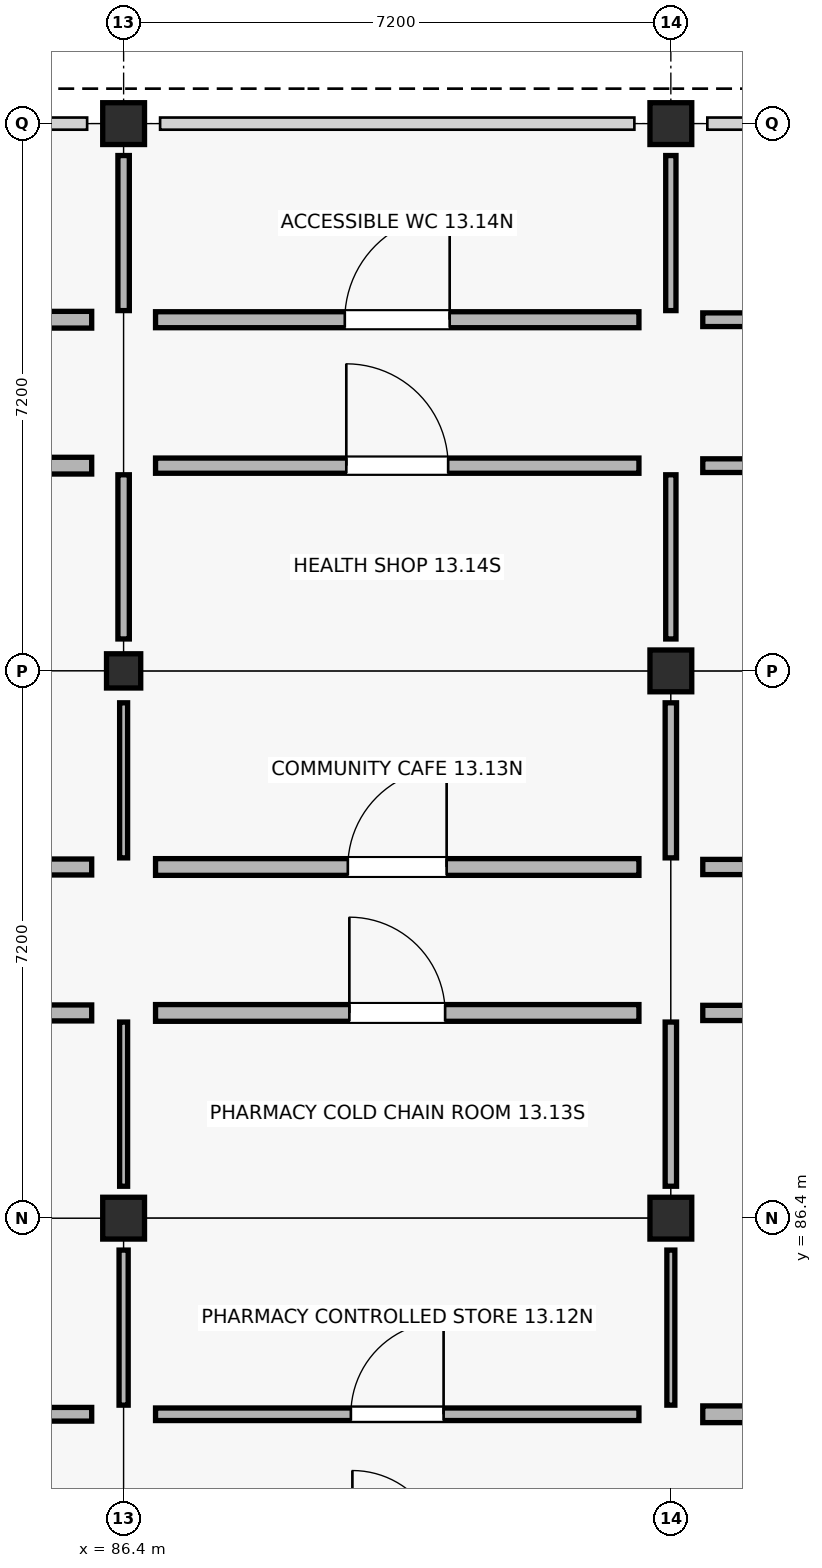
"""IFC4 building model, lengths in metres.
Left out: names, types, materials, properties, quantities, classifications, styles, units other than length and angle.
Written with IfcOpenShell. Run it as: python <this file> out.ifc"""

import sys

from ifc_helpers import new_model, si_unit, direction, frame, frame_2d, origin, origin_2d, place, context, subcontext, project, spatial, rectangle, extrude, element, fill, save


model = new_model("IFC4")
c1 = context("Model", 3, precision=1e-05, world=origin(), true_north=direction((0.0, 1.0)))
c2 = subcontext(c1, "Body", "Model", "MODEL_VIEW")
j1 = project(units=[si_unit("LENGTHUNIT", "METRE"), si_unit("PLANEANGLEUNIT", "RADIAN")], contexts=[c1])
p1 = place(None, origin())
s1 = spatial("IfcSite", under=j1, at=p1, CompositionType="ELEMENT")
p2 = place(p1, origin())
s2 = spatial("IfcBuilding", under=s1, at=p2, CompositionType="ELEMENT")
p3 = place(p2, origin())
s3 = spatial("IfcBuildingStorey", under=s2, at=p3, CompositionType="ELEMENT", Elevation=0.0)
p4 = place(p3, frame((86.4, 86.4, -0.25), z_axis=(0.0, 0.0, 1.0), x_axis=(1.0, 0.0, 0.0)))
e1 = element("IfcColumn", 1, at=p4, inside=s3, PredefinedType="COLUMN", context=c2, shape_type="SweptSolid", body=[
    extrude(rectangle(XDim=0.55, YDim=0.55, at=origin_2d()), origin(), (0.0, 0.0, 1.0), 4.75),
])
p5 = place(p3, frame((86.4, 93.6, -0.25), z_axis=(0.0, 0.0, 1.0), x_axis=(1.0, 0.0, 0.0)))
e2 = element("IfcColumn", 2, at=p5, inside=s3, PredefinedType="COLUMN", context=c2, shape_type="SweptSolid", body=[
    extrude(rectangle(XDim=0.45, YDim=0.45, at=origin_2d()), origin(), (0.0, 0.0, 1.0), 4.53),
])
for number, where, z_axis, x_axis in (
    (3, (86.4, 100.8, -0.25), (0.0, 0.0, 1.0), (1.0, 0.0, 0.0)),
    (4, (93.6, 86.4, -0.25), (0.0, 0.0, 1.0), (1.0, 0.0, 0.0)),
    (5, (93.6, 93.6, -0.25), (0.0, 0.0, 1.0), (1.0, 0.0, 0.0)),
    (6, (93.6, 100.8, -0.25), (0.0, 0.0, 1.0), (1.0, 0.0, 0.0)),
):
    element("IfcColumn", number, at=place(p3, frame(where, z_axis=z_axis, x_axis=x_axis)), inside=s3, PredefinedType="COLUMN", context=c2, shape_type="SweptSolid", body=[
        extrude(rectangle(XDim=0.55, YDim=0.55, at=origin_2d()), origin(), (0.0, 0.0, 1.0), 4.75),
    ])
p6 = place(p3, frame((79.62, 83.82, 0.0), z_axis=(0.0, 0.0, 1.0), x_axis=(1.0, 0.0, 0.0)))
e7 = element("IfcWall", 7, at=p6, inside=s3, PredefinedType="PARTITIONING", context=c2, shape_type="SweptSolid", body=[
    extrude(rectangle(XDim=6.36, YDim=0.18, at=frame_2d((3.18, 0.0))), origin(), (0.0, 0.0, 1.0), 3.36),
])
p7 = place(p6, frame((2.69, 0.0, 0.0)))
e8 = element("IfcOpeningElement", 8, at=p7, cuts=e7, PredefinedType="OPENING", context=c2, shape_type="SweptSolid", body=[
    extrude(rectangle(XDim=0.98, YDim=2.04, at=frame_2d((0.49, 1.02))), frame((0.0, 0.1, 0.0), z_axis=(0.0, -1.0, 0.0), x_axis=(1.0, 0.0, 0.0)), (0.0, 0.0, 1.0), 0.2),
])
p8 = place(p3, frame((86.4, 83.94, 0.0), z_axis=(0.0, 0.0, 1.0), x_axis=(0.0, 1.0, 0.0)))
e9 = element("IfcWall", 9, at=p8, inside=s3, PredefinedType="PARTITIONING", context=c2, shape_type="SweptSolid", body=[
    extrude(rectangle(XDim=2.04, YDim=0.12, at=frame_2d((1.02, 0.0))), origin(), (0.0, 0.0, 1.0), 3.36),
])
p9 = place(p3, frame((79.62, 89.1, 0.0), z_axis=(0.0, 0.0, 1.0), x_axis=(1.0, 0.0, 0.0)))
e10 = element("IfcWall", 10, at=p9, inside=s3, PredefinedType="PLUMBINGWALL", context=c2, shape_type="SweptSolid", body=[
    extrude(rectangle(XDim=6.36, YDim=0.21, at=frame_2d((3.18, 0.0))), origin(), (0.0, 0.0, 1.0), 3.36),
])
p10 = place(p9, frame((2.67, 0.0, 0.0)))
e11 = element("IfcOpeningElement", 11, at=p10, cuts=e10, PredefinedType="OPENING", context=c2, shape_type="SweptSolid", body=[
    extrude(rectangle(XDim=1.02, YDim=2.04, at=frame_2d((0.51, 1.02))), frame((0.0, 0.115, 0.0), z_axis=(0.0, -1.0, 0.0), x_axis=(1.0, 0.0, 0.0)), (0.0, 0.0, 1.0), 0.23),
])
p11 = place(p3, frame((86.4, 86.82, 0.0), z_axis=(0.0, 0.0, 1.0), x_axis=(0.0, 1.0, 0.0)))
e12 = element("IfcWall", 12, at=p11, inside=s3, PredefinedType="PARTITIONING", context=c2, shape_type="SweptSolid", body=[
    extrude(rectangle(XDim=2.16, YDim=0.105, at=frame_2d((1.08, 0.0))), origin(), (0.0, 0.0, 1.0), 3.36),
])
p12 = place(p3, frame((79.62, 91.02, 0.0), z_axis=(0.0, 0.0, 1.0), x_axis=(1.0, 0.0, 0.0)))
e13 = element("IfcWall", 13, at=p12, inside=s3, PredefinedType="PLUMBINGWALL", context=c2, shape_type="SweptSolid", body=[
    extrude(rectangle(XDim=6.36, YDim=0.21, at=frame_2d((3.18, 0.0))), origin(), (0.0, 0.0, 1.0), 3.36),
])
p13 = place(p12, frame((2.65, 0.0, 0.0)))
e14 = element("IfcOpeningElement", 14, at=p13, cuts=e13, PredefinedType="OPENING", context=c2, shape_type="SweptSolid", body=[
    extrude(rectangle(XDim=1.06, YDim=2.04, at=frame_2d((0.53, 1.02))), frame((0.0, 0.115, 0.0), z_axis=(0.0, -1.0, 0.0), x_axis=(1.0, 0.0, 0.0)), (0.0, 0.0, 1.0), 0.23),
])
p14 = place(p3, frame((86.4, 91.14, 0.0), z_axis=(0.0, 0.0, 1.0), x_axis=(0.0, 1.0, 0.0)))
e15 = element("IfcWall", 15, at=p14, inside=s3, PredefinedType="PARTITIONING", context=c2, shape_type="SweptSolid", body=[
    extrude(rectangle(XDim=2.04, YDim=0.105, at=frame_2d((1.02, 0.0))), origin(), (0.0, 0.0, 1.0), 3.36),
])
p15 = place(p3, frame((79.62, 96.3, 0.0), z_axis=(0.0, 0.0, 1.0), x_axis=(1.0, 0.0, 0.0)))
e16 = element("IfcWall", 16, at=p15, inside=s3, PredefinedType="SOLIDWALL", context=c2, shape_type="SweptSolid", body=[
    extrude(rectangle(XDim=6.36, YDim=0.22, at=frame_2d((3.18, 0.0))), origin(), (0.0, 0.0, 1.0), 3.36),
])
p16 = place(p15, frame((2.63, 0.0, 0.0)))
e17 = element("IfcOpeningElement", 17, at=p16, cuts=e16, PredefinedType="OPENING", context=c2, shape_type="SweptSolid", body=[
    extrude(rectangle(XDim=1.1, YDim=2.04, at=frame_2d((0.55, 1.02))), frame((0.0, 0.12, 0.0), z_axis=(0.0, -1.0, 0.0), x_axis=(1.0, 0.0, 0.0)), (0.0, 0.0, 1.0), 0.24),
])
p17 = place(p3, frame((86.4, 94.02, 0.0), z_axis=(0.0, 0.0, 1.0), x_axis=(0.0, 1.0, 0.0)))
e18 = element("IfcWall", 18, at=p17, inside=s3, PredefinedType="PARTITIONING", context=c2, shape_type="SweptSolid", body=[
    extrude(rectangle(XDim=2.16, YDim=0.15, at=frame_2d((1.08, 0.0))), origin(), (0.0, 0.0, 1.0), 3.36),
])
p18 = place(p3, frame((79.62, 98.22, 0.0), z_axis=(0.0, 0.0, 1.0), x_axis=(1.0, 0.0, 0.0)))
e19 = element("IfcWall", 19, at=p18, inside=s3, PredefinedType="SOLIDWALL", context=c2, shape_type="SweptSolid", body=[
    extrude(rectangle(XDim=6.36, YDim=0.22, at=frame_2d((3.18, 0.0))), origin(), (0.0, 0.0, 1.0), 3.36),
])
p19 = place(p18, frame((2.61, 0.0, 0.0)))
e20 = element("IfcOpeningElement", 20, at=p19, cuts=e19, PredefinedType="OPENING", context=c2, shape_type="SweptSolid", body=[
    extrude(rectangle(XDim=1.14, YDim=2.04, at=frame_2d((0.57, 1.02))), frame((0.0, 0.12, 0.0), z_axis=(0.0, -1.0, 0.0), x_axis=(1.0, 0.0, 0.0)), (0.0, 0.0, 1.0), 0.24),
])
p20 = place(p3, frame((86.4, 98.34, 0.0), z_axis=(0.0, 0.0, 1.0), x_axis=(0.0, 1.0, 0.0)))
e21 = element("IfcWall", 21, at=p20, inside=s3, PredefinedType="PARTITIONING", context=c2, shape_type="SweptSolid", body=[
    extrude(rectangle(XDim=2.04, YDim=0.15, at=frame_2d((1.02, 0.0))), origin(), (0.0, 0.0, 1.0), 3.36),
])
p21 = place(p3, frame((86.82, 83.82, 0.0), z_axis=(0.0, 0.0, 1.0), x_axis=(1.0, 0.0, 0.0)))
e22 = element("IfcWall", 22, at=p21, inside=s3, PredefinedType="PARTITIONING", context=c2, shape_type="SweptSolid", body=[
    extrude(rectangle(XDim=6.36, YDim=0.165, at=frame_2d((3.18, 0.0))), origin(), (0.0, 0.0, 1.0), 3.36),
])
p22 = place(p21, frame((2.57, 0.0, 0.0)))
e23 = element("IfcOpeningElement", 23, at=p22, cuts=e22, PredefinedType="OPENING", context=c2, shape_type="SweptSolid", body=[
    extrude(rectangle(XDim=1.22, YDim=2.04, at=frame_2d((0.61, 1.02))), frame((0.0, 0.093, 0.0), z_axis=(0.0, -1.0, 0.0), x_axis=(1.0, 0.0, 0.0)), (0.0, 0.0, 1.0), 0.185),
])
p23 = place(p3, frame((93.6, 83.94, 0.0), z_axis=(0.0, 0.0, 1.0), x_axis=(0.0, 1.0, 0.0)))
e24 = element("IfcWall", 24, at=p23, inside=s3, PredefinedType="PARTITIONING", context=c2, shape_type="SweptSolid", body=[
    extrude(rectangle(XDim=2.04, YDim=0.105, at=frame_2d((1.02, 0.0))), origin(), (0.0, 0.0, 1.0), 3.36),
])
p24 = place(p3, frame((86.82, 89.1, 0.0), z_axis=(0.0, 0.0, 1.0), x_axis=(1.0, 0.0, 0.0)))
e25 = element("IfcWall", 25, at=p24, inside=s3, PredefinedType="SOLIDWALL", context=c2, shape_type="SweptSolid", body=[
    extrude(rectangle(XDim=6.36, YDim=0.22, at=frame_2d((3.18, 0.0))), origin(), (0.0, 0.0, 1.0), 3.36),
])
p25 = place(p24, frame((2.55, 0.0, 0.0)))
e26 = element("IfcOpeningElement", 26, at=p25, cuts=e25, PredefinedType="OPENING", context=c2, shape_type="SweptSolid", body=[
    extrude(rectangle(XDim=1.26, YDim=2.04, at=frame_2d((0.63, 1.02))), frame((0.0, 0.12, 0.0), z_axis=(0.0, -1.0, 0.0), x_axis=(1.0, 0.0, 0.0)), (0.0, 0.0, 1.0), 0.24),
])
p26 = place(p3, frame((93.6, 86.82, 0.0), z_axis=(0.0, 0.0, 1.0), x_axis=(0.0, 1.0, 0.0)))
e27 = element("IfcWall", 27, at=p26, inside=s3, PredefinedType="PARTITIONING", context=c2, shape_type="SweptSolid", body=[
    extrude(rectangle(XDim=2.16, YDim=0.15, at=frame_2d((1.08, 0.0))), origin(), (0.0, 0.0, 1.0), 3.36),
])
p27 = place(p3, frame((86.82, 91.02, 0.0), z_axis=(0.0, 0.0, 1.0), x_axis=(1.0, 0.0, 0.0)))
e28 = element("IfcWall", 28, at=p27, inside=s3, PredefinedType="SOLIDWALL", context=c2, shape_type="SweptSolid", body=[
    extrude(rectangle(XDim=6.36, YDim=0.22, at=frame_2d((3.18, 0.0))), origin(), (0.0, 0.0, 1.0), 3.36),
])
p28 = place(p27, frame((2.53, 0.0, 0.0)))
e29 = element("IfcOpeningElement", 29, at=p28, cuts=e28, PredefinedType="OPENING", context=c2, shape_type="SweptSolid", body=[
    extrude(rectangle(XDim=1.3, YDim=2.04, at=frame_2d((0.65, 1.02))), frame((0.0, 0.12, 0.0), z_axis=(0.0, -1.0, 0.0), x_axis=(1.0, 0.0, 0.0)), (0.0, 0.0, 1.0), 0.24),
])
p29 = place(p3, frame((93.6, 91.14, 0.0), z_axis=(0.0, 0.0, 1.0), x_axis=(0.0, 1.0, 0.0)))
e30 = element("IfcWall", 30, at=p29, inside=s3, PredefinedType="PARTITIONING", context=c2, shape_type="SweptSolid", body=[
    extrude(rectangle(XDim=2.04, YDim=0.15, at=frame_2d((1.02, 0.0))), origin(), (0.0, 0.0, 1.0), 3.36),
])
p30 = place(p3, frame((86.82, 96.3, 0.0), z_axis=(0.0, 0.0, 1.0), x_axis=(1.0, 0.0, 0.0)))
e31 = element("IfcWall", 31, at=p30, inside=s3, PredefinedType="SOLIDWALL", context=c2, shape_type="SweptSolid", body=[
    extrude(rectangle(XDim=6.36, YDim=0.2, at=frame_2d((3.18, 0.0))), origin(), (0.0, 0.0, 1.0), 3.36),
])
p31 = place(p30, frame((2.51, 0.0, 0.0)))
e32 = element("IfcOpeningElement", 32, at=p31, cuts=e31, PredefinedType="OPENING", context=c2, shape_type="SweptSolid", body=[
    extrude(rectangle(XDim=1.34, YDim=2.04, at=frame_2d((0.67, 1.02))), frame((0.0, 0.11, 0.0), z_axis=(0.0, -1.0, 0.0), x_axis=(1.0, 0.0, 0.0)), (0.0, 0.0, 1.0), 0.22),
])
p32 = place(p3, frame((93.6, 94.02, 0.0), z_axis=(0.0, 0.0, 1.0), x_axis=(0.0, 1.0, 0.0)))
e33 = element("IfcWall", 33, at=p32, inside=s3, PredefinedType="PARTITIONING", context=c2, shape_type="SweptSolid", body=[
    extrude(rectangle(XDim=2.16, YDim=0.135, at=frame_2d((1.08, 0.0))), origin(), (0.0, 0.0, 1.0), 3.36),
])
p33 = place(p3, frame((86.82, 98.22, 0.0), z_axis=(0.0, 0.0, 1.0), x_axis=(1.0, 0.0, 0.0)))
e34 = element("IfcWall", 34, at=p33, inside=s3, PredefinedType="PLUMBINGWALL", context=c2, shape_type="SweptSolid", body=[
    extrude(rectangle(XDim=6.36, YDim=0.21, at=frame_2d((3.18, 0.0))), origin(), (0.0, 0.0, 1.0), 3.36),
])
p34 = place(p33, frame((2.49, 0.0, 0.0)))
e35 = element("IfcOpeningElement", 35, at=p34, cuts=e34, PredefinedType="OPENING", context=c2, shape_type="SweptSolid", body=[
    extrude(rectangle(XDim=1.38, YDim=2.04, at=frame_2d((0.69, 1.02))), frame((0.0, 0.115, 0.0), z_axis=(0.0, -1.0, 0.0), x_axis=(1.0, 0.0, 0.0)), (0.0, 0.0, 1.0), 0.23),
])
p35 = place(p3, frame((93.6, 98.34, 0.0), z_axis=(0.0, 0.0, 1.0), x_axis=(0.0, 1.0, 0.0)))
e36 = element("IfcWall", 36, at=p35, inside=s3, PredefinedType="PARTITIONING", context=c2, shape_type="SweptSolid", body=[
    extrude(rectangle(XDim=2.04, YDim=0.135, at=frame_2d((1.02, 0.0))), origin(), (0.0, 0.0, 1.0), 3.36),
])
p36 = place(p3, frame((94.02, 83.82, 0.0), z_axis=(0.0, 0.0, 1.0), x_axis=(1.0, 0.0, 0.0)))
e37 = element("IfcWall", 37, at=p36, inside=s3, PredefinedType="SOLIDWALL", context=c2, shape_type="SweptSolid", body=[
    extrude(rectangle(XDim=6.36, YDim=0.22, at=frame_2d((3.18, 0.0))), origin(), (0.0, 0.0, 1.0), 3.36),
])
p37 = place(p36, frame((2.45, 0.0, 0.0)))
e38 = element("IfcOpeningElement", 38, at=p37, cuts=e37, PredefinedType="OPENING", context=c2, shape_type="SweptSolid", body=[
    extrude(rectangle(XDim=1.46, YDim=2.04, at=frame_2d((0.73, 1.02))), frame((0.0, 0.12, 0.0), z_axis=(0.0, -1.0, 0.0), x_axis=(1.0, 0.0, 0.0)), (0.0, 0.0, 1.0), 0.24),
])
p38 = place(p3, frame((94.02, 89.1, 0.0), z_axis=(0.0, 0.0, 1.0), x_axis=(1.0, 0.0, 0.0)))
e39 = element("IfcWall", 39, at=p38, inside=s3, PredefinedType="SOLIDWALL", context=c2, shape_type="SweptSolid", body=[
    extrude(rectangle(XDim=6.36, YDim=0.2, at=frame_2d((3.18, 0.0))), origin(), (0.0, 0.0, 1.0), 3.36),
])
p39 = place(p38, frame((2.43, 0.0, 0.0)))
e40 = element("IfcOpeningElement", 40, at=p39, cuts=e39, PredefinedType="OPENING", context=c2, shape_type="SweptSolid", body=[
    extrude(rectangle(XDim=1.5, YDim=2.04, at=frame_2d((0.75, 1.02))), frame((0.0, 0.11, 0.0), z_axis=(0.0, -1.0, 0.0), x_axis=(1.0, 0.0, 0.0)), (0.0, 0.0, 1.0), 0.22),
])
p40 = place(p3, frame((94.02, 91.02, 0.0), z_axis=(0.0, 0.0, 1.0), x_axis=(1.0, 0.0, 0.0)))
e41 = element("IfcWall", 41, at=p40, inside=s3, PredefinedType="SOLIDWALL", context=c2, shape_type="SweptSolid", body=[
    extrude(rectangle(XDim=6.36, YDim=0.2, at=frame_2d((3.18, 0.0))), origin(), (0.0, 0.0, 1.0), 3.36),
])
p41 = place(p40, frame((2.73, 0.0, 0.0)))
e42 = element("IfcOpeningElement", 42, at=p41, cuts=e41, PredefinedType="OPENING", context=c2, shape_type="SweptSolid", body=[
    extrude(rectangle(XDim=0.9, YDim=2.09, at=frame_2d((0.45, 1.045))), frame((0.0, 0.11, 0.0), z_axis=(0.0, -1.0, 0.0), x_axis=(1.0, 0.0, 0.0)), (0.0, 0.0, 1.0), 0.22),
])
p42 = place(p3, frame((94.02, 96.3, 0.0), z_axis=(0.0, 0.0, 1.0), x_axis=(1.0, 0.0, 0.0)))
e43 = element("IfcWall", 43, at=p42, inside=s3, PredefinedType="PARTITIONING", context=c2, shape_type="SweptSolid", body=[
    extrude(rectangle(XDim=6.36, YDim=0.18, at=frame_2d((3.18, 0.0))), origin(), (0.0, 0.0, 1.0), 3.36),
])
p43 = place(p42, frame((2.71, 0.0, 0.0)))
e44 = element("IfcOpeningElement", 44, at=p43, cuts=e43, PredefinedType="OPENING", context=c2, shape_type="SweptSolid", body=[
    extrude(rectangle(XDim=0.94, YDim=2.09, at=frame_2d((0.47, 1.045))), frame((0.0, 0.1, 0.0), z_axis=(0.0, -1.0, 0.0), x_axis=(1.0, 0.0, 0.0)), (0.0, 0.0, 1.0), 0.2),
])
p44 = place(p3, frame((94.02, 98.22, 0.0), z_axis=(0.0, 0.0, 1.0), x_axis=(1.0, 0.0, 0.0)))
e45 = element("IfcWall", 45, at=p44, inside=s3, PredefinedType="PARTITIONING", context=c2, shape_type="SweptSolid", body=[
    extrude(rectangle(XDim=6.36, YDim=0.18, at=frame_2d((3.18, 0.0))), origin(), (0.0, 0.0, 1.0), 3.36),
])
p45 = place(p44, frame((2.69, 0.0, 0.0)))
e46 = element("IfcOpeningElement", 46, at=p45, cuts=e45, PredefinedType="OPENING", context=c2, shape_type="SweptSolid", body=[
    extrude(rectangle(XDim=0.98, YDim=2.09, at=frame_2d((0.49, 1.045))), frame((0.0, 0.1, 0.0), z_axis=(0.0, -1.0, 0.0), x_axis=(1.0, 0.0, 0.0)), (0.0, 0.0, 1.0), 0.2),
])
p46 = place(p22, origin())
e47 = element("IfcDoor", 47, at=p46, inside=s3, OperationType="SINGLE_SWING_RIGHT", PredefinedType="DOOR", context=c2, shape_type="SweptSolid", body=[
    extrude(rectangle(XDim=1.22, YDim=2.04, at=frame_2d((0.61, 1.02))), frame((0.0, 0.025, 0.0), z_axis=(0.0, -1.0, 0.0), x_axis=(1.0, 0.0, 0.0)), (0.0, 0.0, 1.0), 0.05),
])
fill(e23, e47)
p47 = place(p25, origin())
e48 = element("IfcDoor", 48, at=p47, inside=s3, OperationType="SINGLE_SWING_LEFT", PredefinedType="DOOR", context=c2, shape_type="SweptSolid", body=[
    extrude(rectangle(XDim=1.26, YDim=2.04, at=frame_2d((0.63, 1.02))), frame((0.0, 0.025, 0.0), z_axis=(0.0, -1.0, 0.0), x_axis=(1.0, 0.0, 0.0)), (0.0, 0.0, 1.0), 0.05),
])
fill(e26, e48)
p48 = place(p28, origin())
e49 = element("IfcDoor", 49, at=p48, inside=s3, OperationType="SINGLE_SWING_RIGHT", PredefinedType="DOOR", context=c2, shape_type="SweptSolid", body=[
    extrude(rectangle(XDim=1.3, YDim=2.04, at=frame_2d((0.65, 1.02))), frame((0.0, 0.025, 0.0), z_axis=(0.0, -1.0, 0.0), x_axis=(1.0, 0.0, 0.0)), (0.0, 0.0, 1.0), 0.05),
])
fill(e29, e49)
p49 = place(p31, origin())
e50 = element("IfcDoor", 50, at=p49, inside=s3, OperationType="SINGLE_SWING_LEFT", PredefinedType="DOOR", context=c2, shape_type="SweptSolid", body=[
    extrude(rectangle(XDim=1.34, YDim=2.04, at=frame_2d((0.67, 1.02))), frame((0.0, 0.025, 0.0), z_axis=(0.0, -1.0, 0.0), x_axis=(1.0, 0.0, 0.0)), (0.0, 0.0, 1.0), 0.05),
])
fill(e32, e50)
p50 = place(p34, origin())
e51 = element("IfcDoor", 51, at=p50, inside=s3, OperationType="SINGLE_SWING_RIGHT", PredefinedType="DOOR", context=c2, shape_type="SweptSolid", body=[
    extrude(rectangle(XDim=1.38, YDim=2.04, at=frame_2d((0.69, 1.02))), frame((0.0, 0.025, 0.0), z_axis=(0.0, -1.0, 0.0), x_axis=(1.0, 0.0, 0.0)), (0.0, 0.0, 1.0), 0.05),
])
fill(e35, e51)
save(model, sys.argv[1])
